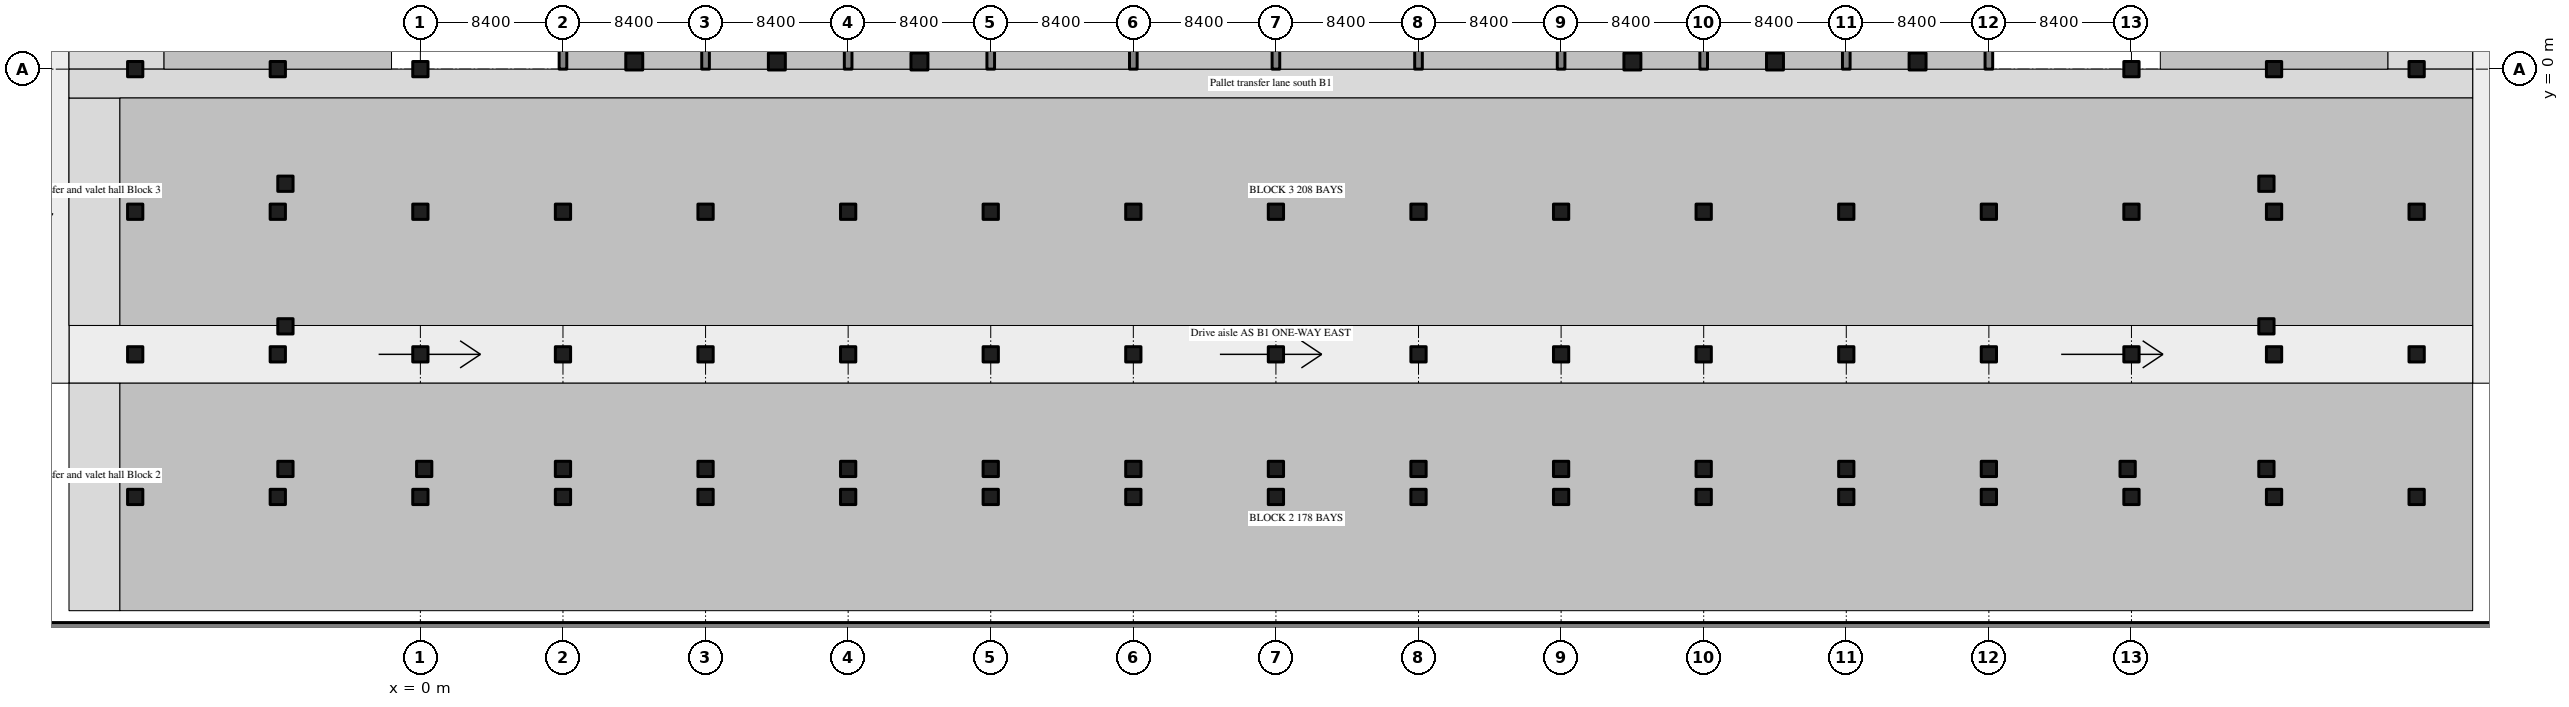
"""IFC4 building model, lengths in metres.
Left out: names, types, materials, properties, quantities, classifications, styles, units other than length and angle.
Written with IfcOpenShell. Run it as: python <this file> out.ifc"""

import sys

from ifc_helpers import new_model, si_unit, direction, frame, frame_2d, origin, origin_2d, place, context, subcontext, project, spatial, rectangle, extrude, source, transform, mapped, element, save


model = new_model("IFC4")
c1 = context("Model", 3, precision=1e-05, world=origin(), true_north=direction((0.0, 1.0)))
c2 = subcontext(c1, "Body", "Model", "MODEL_VIEW")
j1 = project(units=[si_unit("LENGTHUNIT", "METRE"), si_unit("PLANEANGLEUNIT", "RADIAN")], contexts=[c1])
p1 = place(None, origin())
s1 = spatial("IfcSite", under=j1, at=p1, CompositionType="ELEMENT")
p2 = place(p1, origin())
s2 = spatial("IfcBuilding", under=s1, at=p2, CompositionType="ELEMENT")
p3 = place(p2, frame((0.0, 0.0, -4.5)))
s3 = spatial("IfcBuildingStorey", under=s2, at=p3, CompositionType="ELEMENT", Elevation=-4.5)
m1 = source(origin(), c2, "Body", "SweptSolid", [
    extrude(rectangle(XDim=151.2, YDim=1.0, at=frame_2d((75.6, 0.0))), origin(), (0.0, 0.0, 1.0), 4.22),
])
p4 = place(p3, frame((-25.2, -33.1, 0.0), z_axis=(0.0, 0.0, 1.0), x_axis=(1.0, 0.0, 0.0)))
e1 = element("IfcWall", 1, at=p4, inside=s3, PredefinedType="SHEAR", context=c2, shape_type="MappedRepresentation", body=[
    mapped(m1, transform((0.0, 0.0, 0.0), scale=1.0)),
])
m2 = source(origin(), c2, "Body", "SweptSolid", [
    extrude(rectangle(XDim=19.6, YDim=0.45, at=frame_2d((9.8, 0.0))), origin(), (0.0, 0.0, 1.0), 4.22),
])
for number, where, z_axis, x_axis in (
    (2, (8.4, 0.0, 0.0), (0.0, 0.0, 1.0), (0.0, 1.0, 0.0)),
    (3, (16.8, 0.0, 0.0), (0.0, 0.0, 1.0), (0.0, 1.0, 0.0)),
    (4, (25.2, 0.0, 0.0), (0.0, 0.0, 1.0), (0.0, 1.0, 0.0)),
    (5, (33.6, 0.0, 0.0), (0.0, 0.0, 1.0), (0.0, 1.0, 0.0)),
    (6, (42.0, 0.0, 0.0), (0.0, 0.0, 1.0), (0.0, 1.0, 0.0)),
    (7, (50.4, 0.0, 0.0), (0.0, 0.0, 1.0), (0.0, 1.0, 0.0)),
    (8, (58.8, 0.0, 0.0), (0.0, 0.0, 1.0), (0.0, 1.0, 0.0)),
    (9, (67.2, 0.0, 0.0), (0.0, 0.0, 1.0), (0.0, 1.0, 0.0)),
    (10, (75.6, 0.0, 0.0), (0.0, 0.0, 1.0), (0.0, 1.0, 0.0)),
    (11, (84.0, 0.0, 0.0), (0.0, 0.0, 1.0), (0.0, 1.0, 0.0)),
    (12, (92.4, 0.0, 0.0), (0.0, 0.0, 1.0), (0.0, 1.0, 0.0)),
):
    element("IfcWall", number, at=place(p3, frame(where, z_axis=z_axis, x_axis=x_axis)), inside=s3, PredefinedType="SHEAR", context=c2, shape_type="MappedRepresentation", body=[
        mapped(m2, transform((0.0, 0.0, 0.0), scale=1.0)),
    ])
m3 = source(origin(), c2, "Body", "SweptSolid", [
    extrude(rectangle(XDim=1.0, YDim=1.0, at=origin_2d()), origin(), (0.0, 0.0, 1.0), 4.22),
])
for number, where, z_axis, x_axis in (
    (13, (12.6, 0.45, 0.0), (0.0, 0.0, 1.0), (1.0, 0.0, 0.0)),
    (14, (21.0, 0.45, 0.0), (0.0, 0.0, 1.0), (1.0, 0.0, 0.0)),
    (15, (29.4, 0.45, 0.0), (0.0, 0.0, 1.0), (1.0, 0.0, 0.0)),
    (16, (71.4, 0.45, 0.0), (0.0, 0.0, 1.0), (1.0, 0.0, 0.0)),
    (17, (79.8, 0.45, 0.0), (0.0, 0.0, 1.0), (1.0, 0.0, 0.0)),
    (18, (88.2, 0.45, 0.0), (0.0, 0.0, 1.0), (1.0, 0.0, 0.0)),
):
    element("IfcColumn", number, at=place(p3, frame(where, z_axis=z_axis, x_axis=x_axis)), inside=s3, PredefinedType="COLUMN", context=c2, shape_type="MappedRepresentation", body=[
        mapped(m3, transform((0.0, 0.0, 0.0), scale=1.0)),
    ])
m4 = source(origin(), c2, "Body", "SweptSolid", [
    extrude(rectangle(XDim=0.9, YDim=0.9, at=origin_2d()), origin(), (0.0, 0.0, 1.0), 4.22),
])
for number, where, z_axis, x_axis in (
    (19, (-7.95, -23.55, 0.0), (0.0, 0.0, 1.0), (1.0, 0.0, 0.0)),
    (20, (108.75, -23.55, 0.0), (0.0, 0.0, 1.0), (1.0, 0.0, 0.0)),
    (21, (-7.95, -15.15, 0.0), (0.0, 0.0, 1.0), (1.0, 0.0, 0.0)),
    (22, (108.75, -15.15, 0.0), (0.0, 0.0, 1.0), (1.0, 0.0, 0.0)),
    (23, (-7.95, -6.75, 0.0), (0.0, 0.0, 1.0), (1.0, 0.0, 0.0)),
    (24, (108.75, -6.75, 0.0), (0.0, 0.0, 1.0), (1.0, 0.0, 0.0)),
    (25, (0.225, -23.55, 0.0), (0.0, 0.0, 1.0), (1.0, 0.0, 0.0)),
    (26, (8.4, -23.55, 0.0), (0.0, 0.0, 1.0), (1.0, 0.0, 0.0)),
    (27, (16.8, -23.55, 0.0), (0.0, 0.0, 1.0), (1.0, 0.0, 0.0)),
    (28, (25.2, -23.55, 0.0), (0.0, 0.0, 1.0), (1.0, 0.0, 0.0)),
    (29, (33.6, -23.55, 0.0), (0.0, 0.0, 1.0), (1.0, 0.0, 0.0)),
    (30, (42.0, -23.55, 0.0), (0.0, 0.0, 1.0), (1.0, 0.0, 0.0)),
    (31, (50.4, -23.55, 0.0), (0.0, 0.0, 1.0), (1.0, 0.0, 0.0)),
    (32, (58.8, -23.55, 0.0), (0.0, 0.0, 1.0), (1.0, 0.0, 0.0)),
    (33, (67.2, -23.55, 0.0), (0.0, 0.0, 1.0), (1.0, 0.0, 0.0)),
    (34, (75.6, -23.55, 0.0), (0.0, 0.0, 1.0), (1.0, 0.0, 0.0)),
    (35, (84.0, -23.55, 0.0), (0.0, 0.0, 1.0), (1.0, 0.0, 0.0)),
    (36, (92.4, -23.55, 0.0), (0.0, 0.0, 1.0), (1.0, 0.0, 0.0)),
    (37, (100.575, -23.55, 0.0), (0.0, 0.0, 1.0), (1.0, 0.0, 0.0)),
    (38, (-16.8, -25.2, 0.0), (0.0, 0.0, 1.0), (1.0, 0.0, 0.0)),
    (39, (-16.8, -16.8, 0.0), (0.0, 0.0, 1.0), (1.0, 0.0, 0.0)),
    (40, (-16.8, -8.4, 0.0), (0.0, 0.0, 1.0), (1.0, 0.0, 0.0)),
    (41, (-16.8, 0.0, 0.0), (0.0, 0.0, 1.0), (1.0, 0.0, 0.0)),
    (42, (-8.4, -25.2, 0.0), (0.0, 0.0, 1.0), (1.0, 0.0, 0.0)),
    (43, (-8.4, -16.8, 0.0), (0.0, 0.0, 1.0), (1.0, 0.0, 0.0)),
    (44, (-8.4, -8.4, 0.0), (0.0, 0.0, 1.0), (1.0, 0.0, 0.0)),
    (45, (-8.4, 0.0, 0.0), (0.0, 0.0, 1.0), (1.0, 0.0, 0.0)),
    (46, (0.0, -25.2, 0.0), (0.0, 0.0, 1.0), (1.0, 0.0, 0.0)),
    (47, (0.0, -16.8, 0.0), (0.0, 0.0, 1.0), (1.0, 0.0, 0.0)),
    (48, (0.0, -8.4, 0.0), (0.0, 0.0, 1.0), (1.0, 0.0, 0.0)),
    (49, (0.0, 0.0, 0.0), (0.0, 0.0, 1.0), (1.0, 0.0, 0.0)),
    (50, (8.4, -25.2, 0.0), (0.0, 0.0, 1.0), (1.0, 0.0, 0.0)),
    (51, (8.4, -16.8, 0.0), (0.0, 0.0, 1.0), (1.0, 0.0, 0.0)),
    (52, (8.4, -8.4, 0.0), (0.0, 0.0, 1.0), (1.0, 0.0, 0.0)),
    (53, (16.8, -25.2, 0.0), (0.0, 0.0, 1.0), (1.0, 0.0, 0.0)),
    (54, (16.8, -16.8, 0.0), (0.0, 0.0, 1.0), (1.0, 0.0, 0.0)),
    (55, (16.8, -8.4, 0.0), (0.0, 0.0, 1.0), (1.0, 0.0, 0.0)),
    (56, (25.2, -25.2, 0.0), (0.0, 0.0, 1.0), (1.0, 0.0, 0.0)),
    (57, (25.2, -16.8, 0.0), (0.0, 0.0, 1.0), (1.0, 0.0, 0.0)),
    (58, (25.2, -8.4, 0.0), (0.0, 0.0, 1.0), (1.0, 0.0, 0.0)),
    (59, (33.6, -25.2, 0.0), (0.0, 0.0, 1.0), (1.0, 0.0, 0.0)),
    (60, (33.6, -16.8, 0.0), (0.0, 0.0, 1.0), (1.0, 0.0, 0.0)),
    (61, (33.6, -8.4, 0.0), (0.0, 0.0, 1.0), (1.0, 0.0, 0.0)),
    (62, (42.0, -25.2, 0.0), (0.0, 0.0, 1.0), (1.0, 0.0, 0.0)),
    (63, (42.0, -16.8, 0.0), (0.0, 0.0, 1.0), (1.0, 0.0, 0.0)),
    (64, (42.0, -8.4, 0.0), (0.0, 0.0, 1.0), (1.0, 0.0, 0.0)),
    (65, (50.4, -25.2, 0.0), (0.0, 0.0, 1.0), (1.0, 0.0, 0.0)),
    (66, (50.4, -16.8, 0.0), (0.0, 0.0, 1.0), (1.0, 0.0, 0.0)),
    (67, (50.4, -8.4, 0.0), (0.0, 0.0, 1.0), (1.0, 0.0, 0.0)),
    (68, (58.8, -25.2, 0.0), (0.0, 0.0, 1.0), (1.0, 0.0, 0.0)),
    (69, (58.8, -16.8, 0.0), (0.0, 0.0, 1.0), (1.0, 0.0, 0.0)),
    (70, (58.8, -8.4, 0.0), (0.0, 0.0, 1.0), (1.0, 0.0, 0.0)),
    (71, (67.2, -25.2, 0.0), (0.0, 0.0, 1.0), (1.0, 0.0, 0.0)),
    (72, (67.2, -16.8, 0.0), (0.0, 0.0, 1.0), (1.0, 0.0, 0.0)),
    (73, (67.2, -8.4, 0.0), (0.0, 0.0, 1.0), (1.0, 0.0, 0.0)),
    (74, (75.6, -25.2, 0.0), (0.0, 0.0, 1.0), (1.0, 0.0, 0.0)),
    (75, (75.6, -16.8, 0.0), (0.0, 0.0, 1.0), (1.0, 0.0, 0.0)),
    (76, (75.6, -8.4, 0.0), (0.0, 0.0, 1.0), (1.0, 0.0, 0.0)),
):
    element("IfcColumn", number, at=place(p3, frame(where, z_axis=z_axis, x_axis=x_axis)), inside=s3, PredefinedType="COLUMN", context=c2, shape_type="MappedRepresentation", body=[
        mapped(m4, transform((0.0, 0.0, 0.0), scale=1.0)),
    ])
m5 = source(origin(), c2, "Body", "SweptSolid", [
    extrude(rectangle(XDim=0.9, YDim=0.9, at=origin_2d()), origin(), (0.0, 0.0, 1.0), 4.05),
])
p5 = place(p3, frame((84.0, -25.2, 0.0), z_axis=(0.0, 0.0, 1.0), x_axis=(1.0, 0.0, 0.0)))
e77 = element("IfcColumn", 77, at=p5, inside=s3, PredefinedType="COLUMN", context=c2, shape_type="MappedRepresentation", body=[
    mapped(m5, transform((0.0, 0.0, 0.0), scale=1.0)),
])
for number, where, z_axis, x_axis in (
    (78, (84.0, -16.8, 0.0), (0.0, 0.0, 1.0), (1.0, 0.0, 0.0)),
    (79, (84.0, -8.4, 0.0), (0.0, 0.0, 1.0), (1.0, 0.0, 0.0)),
):
    element("IfcColumn", number, at=place(p3, frame(where, z_axis=z_axis, x_axis=x_axis)), inside=s3, PredefinedType="COLUMN", context=c2, shape_type="MappedRepresentation", body=[
        mapped(m4, transform((0.0, 0.0, 0.0), scale=1.0)),
    ])
p6 = place(p3, frame((92.4, -25.2, 0.0), z_axis=(0.0, 0.0, 1.0), x_axis=(1.0, 0.0, 0.0)))
e80 = element("IfcColumn", 80, at=p6, inside=s3, PredefinedType="COLUMN", context=c2, shape_type="MappedRepresentation", body=[
    mapped(m5, transform((0.0, 0.0, 0.0), scale=1.0)),
])
for number, where, z_axis, x_axis in (
    (81, (92.4, -16.8, 0.0), (0.0, 0.0, 1.0), (1.0, 0.0, 0.0)),
    (82, (92.4, -8.4, 0.0), (0.0, 0.0, 1.0), (1.0, 0.0, 0.0)),
):
    element("IfcColumn", number, at=place(p3, frame(where, z_axis=z_axis, x_axis=x_axis)), inside=s3, PredefinedType="COLUMN", context=c2, shape_type="MappedRepresentation", body=[
        mapped(m4, transform((0.0, 0.0, 0.0), scale=1.0)),
    ])
p7 = place(p3, frame((100.8, -25.2, 0.0), z_axis=(0.0, 0.0, 1.0), x_axis=(1.0, 0.0, 0.0)))
e83 = element("IfcColumn", 83, at=p7, inside=s3, PredefinedType="COLUMN", context=c2, shape_type="MappedRepresentation", body=[
    mapped(m5, transform((0.0, 0.0, 0.0), scale=1.0)),
])
for number, where, z_axis, x_axis in (
    (84, (100.8, -16.8, 0.0), (0.0, 0.0, 1.0), (1.0, 0.0, 0.0)),
    (85, (100.8, -8.4, 0.0), (0.0, 0.0, 1.0), (1.0, 0.0, 0.0)),
    (86, (100.8, 0.0, 0.0), (0.0, 0.0, 1.0), (1.0, 0.0, 0.0)),
    (87, (109.2, -25.2, 0.0), (0.0, 0.0, 1.0), (1.0, 0.0, 0.0)),
    (88, (109.2, -16.8, 0.0), (0.0, 0.0, 1.0), (1.0, 0.0, 0.0)),
    (89, (109.2, -8.4, 0.0), (0.0, 0.0, 1.0), (1.0, 0.0, 0.0)),
    (90, (109.2, 0.0, 0.0), (0.0, 0.0, 1.0), (1.0, 0.0, 0.0)),
    (91, (117.6, -25.2, 0.0), (0.0, 0.0, 1.0), (1.0, 0.0, 0.0)),
    (92, (117.6, -16.8, 0.0), (0.0, 0.0, 1.0), (1.0, 0.0, 0.0)),
    (93, (117.6, -8.4, 0.0), (0.0, 0.0, 1.0), (1.0, 0.0, 0.0)),
    (94, (117.6, 0.0, 0.0), (0.0, 0.0, 1.0), (1.0, 0.0, 0.0)),
):
    element("IfcColumn", number, at=place(p3, frame(where, z_axis=z_axis, x_axis=x_axis)), inside=s3, PredefinedType="COLUMN", context=c2, shape_type="MappedRepresentation", body=[
        mapped(m4, transform((0.0, 0.0, 0.0), scale=1.0)),
    ])
save(model, sys.argv[1])
